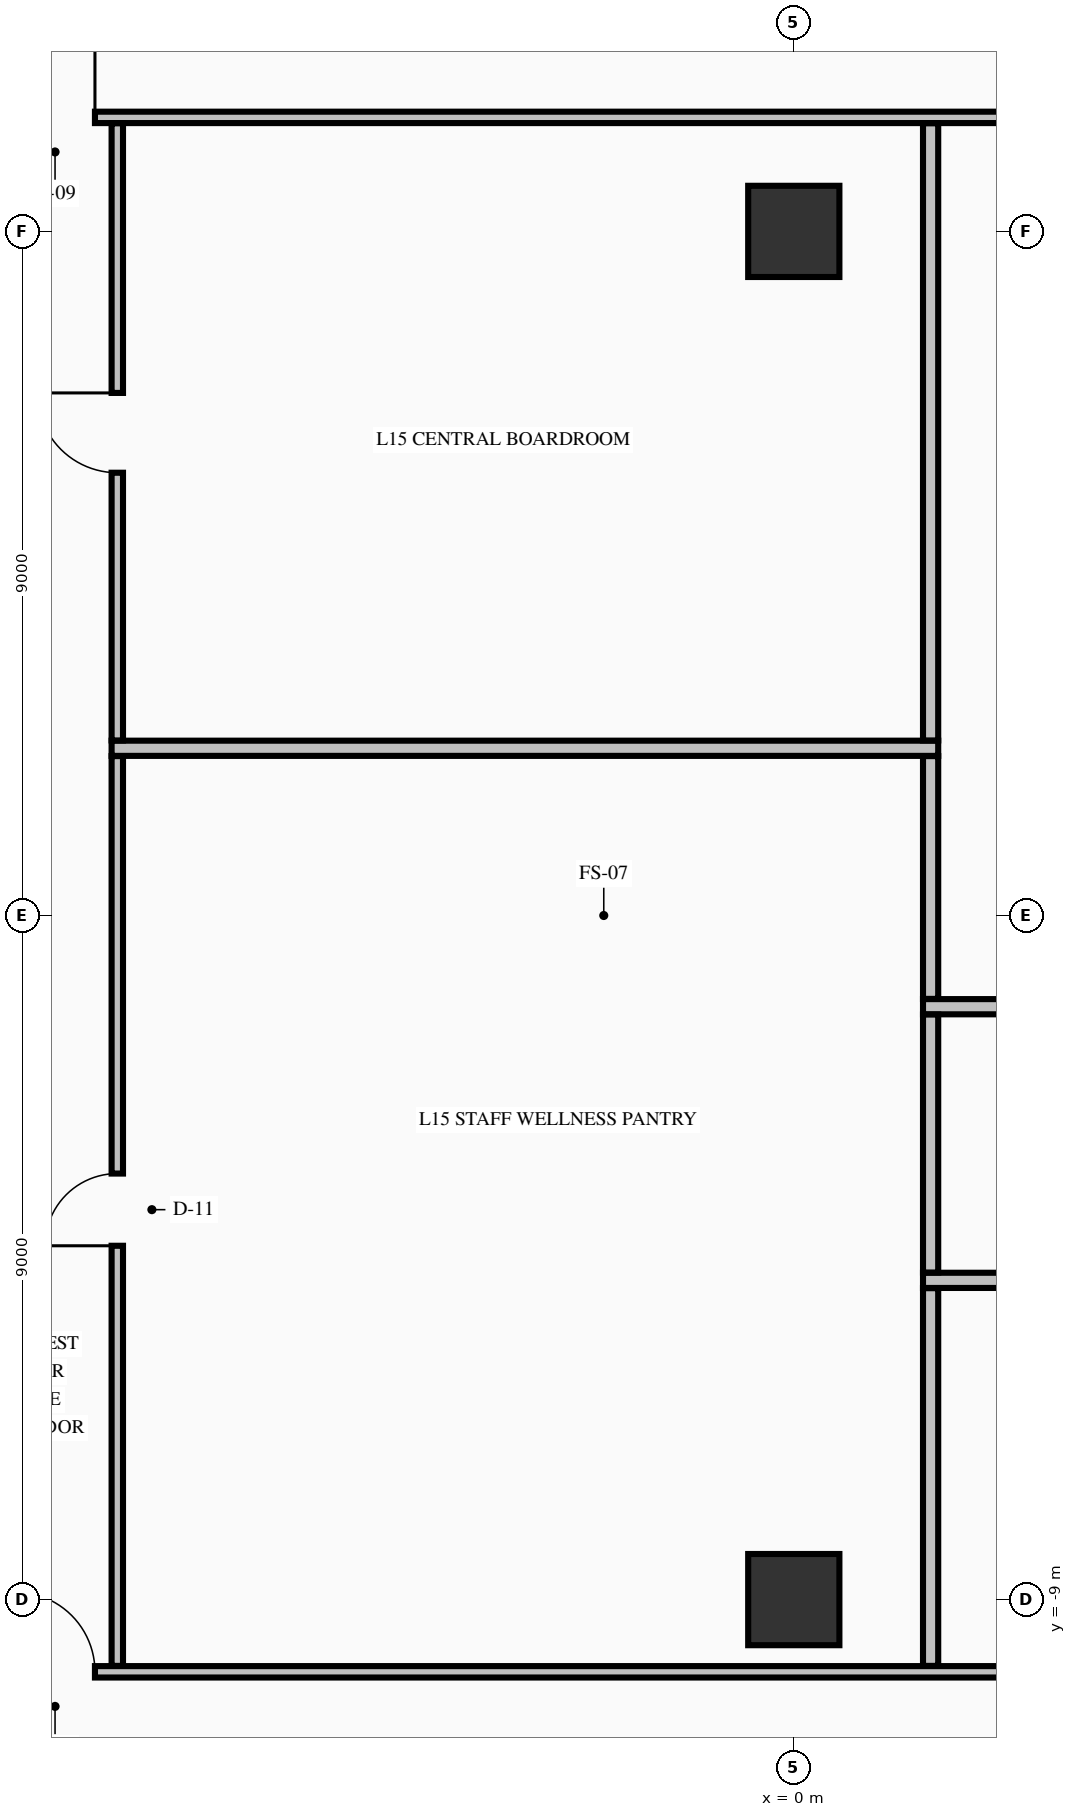
"""IFC4 building model, lengths in metres.
Left out: names, types, materials, properties, quantities, classifications, styles, units other than length and angle.
Written with IfcOpenShell. Run it as: python <this file> out.ifc"""

import sys

from ifc_helpers import new_model, si_unit, direction, frame, frame_2d, origin, origin_2d, place, context, subcontext, project, spatial, rectangle, extrude, element, fill, save


model = new_model("IFC4")
c1 = context("Model", 3, precision=1e-05, world=origin(), true_north=direction((0.0, 1.0)))
c2 = subcontext(c1, "Body", "Model", "MODEL_VIEW")
j1 = project(units=[si_unit("LENGTHUNIT", "METRE"), si_unit("PLANEANGLEUNIT", "RADIAN")], contexts=[c1])
p1 = place(None, origin())
s1 = spatial("IfcSite", under=j1, at=p1, CompositionType="ELEMENT")
p2 = place(p1, origin())
s2 = spatial("IfcBuilding", under=s1, at=p2, CompositionType="ELEMENT")
p3 = place(p2, frame((0.0, 0.0, 64.33)))
s3 = spatial("IfcBuildingStorey", under=s2, at=p3, CompositionType="ELEMENT", Elevation=64.33)
for number, where, z_axis, x_axis in (
    (1, (0.0, -9.0, -0.25), (0.0, 0.0, 1.0), (1.0, 0.0, 0.0)),
    (2, (0.0, 9.0, -0.25), (0.0, 0.0, 1.0), (1.0, 0.0, 0.0)),
):
    element("IfcColumn", number, at=place(p3, frame(where, z_axis=z_axis, x_axis=x_axis)), inside=s3, PredefinedType="COLUMN", context=c2, shape_type="SweptSolid", body=[
        extrude(rectangle(XDim=1.2, YDim=1.2, at=origin_2d()), origin(), (0.0, 0.0, 1.0), 3.57),
    ])
p4 = place(p3, frame((-10.394, -9.95, 0.0), z_axis=(0.0, 0.0, 1.0), x_axis=(1.0, 0.0, 0.0)))
e3 = element("IfcWall", 3, at=p4, inside=s3, PredefinedType="PARTITIONING", context=c2, shape_type="SweptSolid", body=[
    extrude(rectangle(XDim=20.788, YDim=0.15, at=frame_2d((10.394, 0.0))), origin(), (0.0, 0.0, 1.0), 3.32),
])
p5 = place(p4, frame((0.15, 0.0, 0.0)))
e4 = element("IfcOpeningElement", 4, at=p5, cuts=e3, PredefinedType="OPENING", context=c2, shape_type="SweptSolid", body=[
    extrude(rectangle(XDim=1.05, YDim=2.15, at=frame_2d((0.525, 1.075))), frame((0.0, 0.085, 0.0), z_axis=(0.0, -1.0, 0.0), x_axis=(1.0, 0.0, 0.0)), (0.0, 0.0, 1.0), 0.17),
])
p6 = place(p4, frame((19.588, 0.0, 0.0)))
e5 = element("IfcOpeningElement", 5, at=p6, cuts=e3, PredefinedType="OPENING", context=c2, shape_type="SweptSolid", body=[
    extrude(rectangle(XDim=1.05, YDim=2.15, at=frame_2d((0.525, 1.075))), frame((0.0, 0.085, 0.0), z_axis=(0.0, -1.0, 0.0), x_axis=(1.0, 0.0, 0.0)), (0.0, 0.0, 1.0), 0.17),
])
p7 = place(p4, frame((13.769, 0.0, 0.0)))
e6 = element("IfcOpeningElement", 6, at=p7, cuts=e3, PredefinedType="OPENING", context=c2, shape_type="SweptSolid", body=[
    extrude(rectangle(XDim=0.95, YDim=2.15, at=frame_2d((0.475, 1.075))), frame((0.0, 0.085, 0.0), z_axis=(0.0, -1.0, 0.0), x_axis=(1.0, 0.0, 0.0)), (0.0, 0.0, 1.0), 0.17),
])
for number, where, z_axis, x_axis in (
    (7, (1.7, -4.8, 0.0), (0.0, 0.0, 1.0), (1.0, 0.0, 0.0)),
    (8, (1.7, -1.2, 0.0), (0.0, 0.0, 1.0), (1.0, 0.0, 0.0)),
):
    element("IfcWall", number, at=place(p3, frame(where, z_axis=z_axis, x_axis=x_axis)), inside=s3, PredefinedType="PARTITIONING", context=c2, shape_type="SweptSolid", body=[
        extrude(rectangle(XDim=7.275, YDim=0.2, at=frame_2d((3.638, 0.0))), origin(), (0.0, 0.0, 1.0), 3.32),
    ])
p8 = place(p3, frame((-8.975, 2.2, 0.0), z_axis=(0.0, 0.0, 1.0), x_axis=(1.0, 0.0, 0.0)))
e9 = element("IfcWall", 9, at=p8, inside=s3, PredefinedType="PARTITIONING", context=c2, shape_type="SweptSolid", body=[
    extrude(rectangle(XDim=10.875, YDim=0.2, at=frame_2d((5.438, 0.0))), origin(), (0.0, 0.0, 1.0), 3.32),
])
p9 = place(p3, frame((-10.394, 10.5, 0.0), z_axis=(0.0, 0.0, 1.0), x_axis=(1.0, 0.0, 0.0)))
e10 = element("IfcWall", 10, at=p9, inside=s3, PredefinedType="PARTITIONING", context=c2, shape_type="SweptSolid", body=[
    extrude(rectangle(XDim=20.788, YDim=0.15, at=frame_2d((10.394, 0.0))), origin(), (0.0, 0.0, 1.0), 3.32),
])
p10 = place(p9, frame((0.15, 0.0, 0.0)))
e11 = element("IfcOpeningElement", 11, at=p10, cuts=e10, PredefinedType="OPENING", context=c2, shape_type="SweptSolid", body=[
    extrude(rectangle(XDim=1.05, YDim=2.15, at=frame_2d((0.525, 1.075))), frame((0.0, 0.085, 0.0), z_axis=(0.0, -1.0, 0.0), x_axis=(1.0, 0.0, 0.0)), (0.0, 0.0, 1.0), 0.17),
])
p11 = place(p9, frame((19.588, 0.0, 0.0)))
e12 = element("IfcOpeningElement", 12, at=p11, cuts=e10, PredefinedType="OPENING", context=c2, shape_type="SweptSolid", body=[
    extrude(rectangle(XDim=1.05, YDim=2.15, at=frame_2d((0.525, 1.075))), frame((0.0, 0.085, 0.0), z_axis=(0.0, -1.0, 0.0), x_axis=(1.0, 0.0, 0.0)), (0.0, 0.0, 1.0), 0.17),
])
p12 = place(p3, frame((-8.9, -9.872, 0.0), z_axis=(0.0, 0.0, 1.0), x_axis=(0.0, 1.0, 0.0)))
e13 = element("IfcWall", 13, at=p12, inside=s3, PredefinedType="PARTITIONING", context=c2, shape_type="SweptSolid", body=[
    extrude(rectangle(XDim=11.969, YDim=0.15, at=frame_2d((5.984, 0.0))), origin(), (0.0, 0.0, 1.0), 3.32),
])
p13 = place(p12, frame((5.527, 0.0, 0.0)))
e14 = element("IfcOpeningElement", 14, at=p13, cuts=e13, PredefinedType="OPENING", context=c2, shape_type="SweptSolid", body=[
    extrude(rectangle(XDim=0.95, YDim=2.15, at=frame_2d((0.475, 1.075))), frame((0.0, 0.085, 0.0), z_axis=(0.0, -1.0, 0.0), x_axis=(1.0, 0.0, 0.0)), (0.0, 0.0, 1.0), 0.17),
])
p14 = place(p3, frame((-8.9, 2.303, 0.0), z_axis=(0.0, 0.0, 1.0), x_axis=(0.0, 1.0, 0.0)))
e15 = element("IfcWall", 15, at=p14, inside=s3, PredefinedType="PARTITIONING", context=c2, shape_type="SweptSolid", body=[
    extrude(rectangle(XDim=8.119, YDim=0.15, at=frame_2d((4.06, 0.0))), origin(), (0.0, 0.0, 1.0), 3.32),
])
p15 = place(p14, frame((3.522, 0.0, 0.0)))
e16 = element("IfcOpeningElement", 16, at=p15, cuts=e15, PredefinedType="OPENING", context=c2, shape_type="SweptSolid", body=[
    extrude(rectangle(XDim=1.05, YDim=2.15, at=frame_2d((0.525, 1.075))), frame((0.0, 0.085, 0.0), z_axis=(0.0, -1.0, 0.0), x_axis=(1.0, 0.0, 0.0)), (0.0, 0.0, 1.0), 0.17),
])
p16 = place(p3, frame((1.8, -9.872, 0.0), z_axis=(0.0, 0.0, 1.0), x_axis=(0.0, 1.0, 0.0)))
e17 = element("IfcWall", 17, at=p16, inside=s3, PredefinedType="PARTITIONING", context=c2, shape_type="SweptSolid", body=[
    extrude(rectangle(XDim=4.969, YDim=0.2, at=frame_2d((2.484, 0.0))), origin(), (0.0, 0.0, 1.0), 3.32),
])
p17 = place(p3, frame((1.8, -4.697, 0.0), z_axis=(0.0, 0.0, 1.0), x_axis=(0.0, 1.0, 0.0)))
e18 = element("IfcWall", 18, at=p17, inside=s3, PredefinedType="PARTITIONING", context=c2, shape_type="SweptSolid", body=[
    extrude(rectangle(XDim=3.394, YDim=0.2, at=frame_2d((1.697, 0.0))), origin(), (0.0, 0.0, 1.0), 3.32),
])
p18 = place(p3, frame((1.8, -1.097, 0.0), z_axis=(0.0, 0.0, 1.0), x_axis=(0.0, 1.0, 0.0)))
e19 = element("IfcWall", 19, at=p18, inside=s3, PredefinedType="PARTITIONING", context=c2, shape_type="SweptSolid", body=[
    extrude(rectangle(XDim=3.194, YDim=0.2, at=frame_2d((1.597, 0.0))), origin(), (0.0, 0.0, 1.0), 3.32),
])
p19 = place(p3, frame((1.8, 2.303, 0.0), z_axis=(0.0, 0.0, 1.0), x_axis=(0.0, 1.0, 0.0)))
e20 = element("IfcWall", 20, at=p19, inside=s3, PredefinedType="PARTITIONING", context=c2, shape_type="SweptSolid", body=[
    extrude(rectangle(XDim=8.119, YDim=0.2, at=frame_2d((4.06, 0.0))), origin(), (0.0, 0.0, 1.0), 3.32),
])
p20 = place(p10, origin())
e21 = element("IfcDoor", 21, at=p20, inside=s3, OperationType="SINGLE_SWING_RIGHT", PredefinedType="DOOR", context=c2, shape_type="SweptSolid", body=[
    extrude(rectangle(XDim=1.05, YDim=2.15, at=frame_2d((0.525, 1.075))), frame((0.0, 0.025, 0.0), z_axis=(0.0, -1.0, 0.0), x_axis=(1.0, 0.0, 0.0)), (0.0, 0.0, 1.0), 0.05),
])
fill(e11, e21)
p21 = place(p5, origin())
e22 = element("IfcDoor", 22, at=p21, inside=s3, OperationType="SINGLE_SWING_LEFT", PredefinedType="DOOR", context=c2, shape_type="SweptSolid", body=[
    extrude(rectangle(XDim=1.05, YDim=2.15, at=frame_2d((0.525, 1.075))), frame((0.0, 0.025, 0.0), z_axis=(0.0, -1.0, 0.0), x_axis=(1.0, 0.0, 0.0)), (0.0, 0.0, 1.0), 0.05),
])
fill(e4, e22)
p22 = place(p15, origin())
e23 = element("IfcDoor", 23, at=p22, inside=s3, OperationType="SINGLE_SWING_RIGHT", PredefinedType="DOOR", context=c2, shape_type="SweptSolid", body=[
    extrude(rectangle(XDim=1.05, YDim=2.15, at=frame_2d((0.525, 1.075))), frame((0.0, 0.025, 0.0), z_axis=(0.0, -1.0, 0.0), x_axis=(1.0, 0.0, 0.0)), (0.0, 0.0, 1.0), 0.05),
])
fill(e16, e23)
p23 = place(p13, origin())
e24 = element("IfcDoor", 24, at=p23, inside=s3, OperationType="SINGLE_SWING_LEFT", PredefinedType="DOOR", context=c2, shape_type="SweptSolid", body=[
    extrude(rectangle(XDim=0.95, YDim=2.15, at=frame_2d((0.475, 1.075))), frame((0.0, 0.025, 0.0), z_axis=(0.0, -1.0, 0.0), x_axis=(1.0, 0.0, 0.0)), (0.0, 0.0, 1.0), 0.05),
])
fill(e14, e24)
save(model, sys.argv[1])
